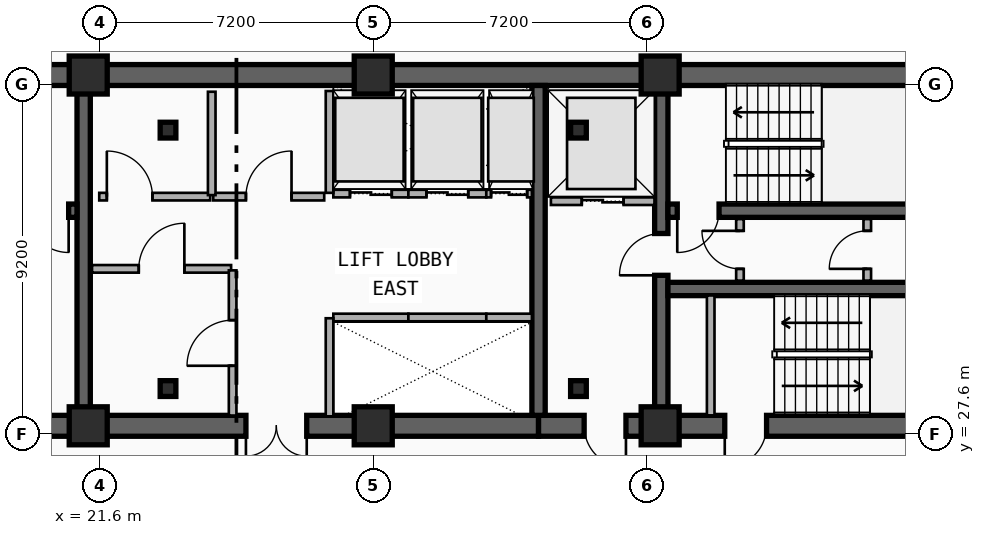
"""IFC4 building model, lengths in metres.
Left out: names, types, materials, properties, quantities, classifications, styles, units other than length and angle.
Written with IfcOpenShell. Run it as: python <this file> out.ifc"""

import sys

from ifc_helpers import new_model, si_unit, direction, frame, frame_2d, origin, origin_2d, place, context, subcontext, project, spatial, rectangle, i_section, extrude, element, fill, save


model = new_model("IFC4")
c1 = context("Model", 3, precision=1e-05, world=origin(), true_north=direction((0.0, 1.0)))
c2 = subcontext(c1, "Body", "Model", "MODEL_VIEW")
j1 = project(units=[si_unit("LENGTHUNIT", "METRE"), si_unit("PLANEANGLEUNIT", "RADIAN")], contexts=[c1])
p1 = place(None, origin())
s1 = spatial("IfcSite", under=j1, at=p1, CompositionType="ELEMENT")
p2 = place(p1, origin())
s2 = spatial("IfcBuilding", under=s1, at=p2, CompositionType="ELEMENT")
p3 = place(p2, frame((0.0, 0.0, 180.3)))
s3 = spatial("IfcBuildingStorey", under=s2, at=p3, CompositionType="ELEMENT", Elevation=180.3)
p4 = place(p3, frame((12.15, 37.05, 0.0), z_axis=(0.0, 0.0, 1.0), x_axis=(1.0, 0.0, 0.0)))
e1 = element("IfcWall", 1, at=p4, inside=s3, PredefinedType="SHEAR", context=c2, shape_type="SweptSolid", body=[
    extrude(rectangle(XDim=33.23, YDim=0.55, at=frame_2d((16.615, 0.0))), origin(), (0.0, 0.0, 1.0), 3.55),
])
p5 = place(p3, frame((21.18, 27.82, 0.0), z_axis=(0.0, 0.0, 1.0), x_axis=(-1.0, 0.0, 0.0)))
e2 = element("IfcWall", 2, at=p5, inside=s3, PredefinedType="SHEAR", context=c2, shape_type="SweptSolid", body=[
    extrude(rectangle(XDim=9.03, YDim=0.55, at=frame_2d((4.515, 0.0))), origin(), (0.0, 0.0, 1.0), 3.55),
])
p6 = place(p5, frame((2.68, 0.0, 0.0)))
e3 = element("IfcOpeningElement", 3, at=p6, cuts=e2, PredefinedType="OPENING", context=c2, shape_type="SweptSolid", body=[
    extrude(rectangle(XDim=1.1, YDim=2.15, at=frame_2d((0.55, 1.075))), frame((0.0, 0.285, 0.0), z_axis=(0.0, -1.0, 0.0), x_axis=(1.0, 0.0, 0.0)), (0.0, 0.0, 1.0), 0.57),
])
p7 = place(p3, frame((33.15, 27.82, 0.0), z_axis=(0.0, 0.0, 1.0), x_axis=(-1.0, 0.0, 0.0)))
e4 = element("IfcWall", 4, at=p7, inside=s3, PredefinedType="SHEAR", context=c2, shape_type="SweptSolid", body=[
    extrude(rectangle(XDim=11.97, YDim=0.55, at=frame_2d((5.985, 0.0))), origin(), (0.0, 0.0, 1.0), 3.55),
])
p8 = place(p7, frame((6.1, 0.0, 0.0)))
e5 = element("IfcOpeningElement", 5, at=p8, cuts=e4, PredefinedType="OPENING", context=c2, shape_type="SweptSolid", body=[
    extrude(rectangle(XDim=1.6, YDim=2.2, at=frame_2d((0.8, 1.1))), frame((0.0, 0.285, 0.0), z_axis=(0.0, -1.0, 0.0), x_axis=(1.0, 0.0, 0.0)), (0.0, 0.0, 1.0), 0.57),
])
p9 = place(p3, frame((45.38, 27.82, 0.0), z_axis=(0.0, 0.0, 1.0), x_axis=(-1.0, 0.0, 0.0)))
e6 = element("IfcWall", 6, at=p9, inside=s3, PredefinedType="SHEAR", context=c2, shape_type="SweptSolid", body=[
    extrude(rectangle(XDim=12.23, YDim=0.55, at=frame_2d((6.115, 0.0))), origin(), (0.0, 0.0, 1.0), 3.55),
])
p10 = place(p9, frame((9.93, 0.0, 0.0)))
e7 = element("IfcOpeningElement", 7, at=p10, cuts=e6, PredefinedType="OPENING", context=c2, shape_type="SweptSolid", body=[
    extrude(rectangle(XDim=1.1, YDim=2.15, at=frame_2d((0.55, 1.075))), frame((0.0, 0.285, 0.0), z_axis=(0.0, -1.0, 0.0), x_axis=(1.0, 0.0, 0.0)), (0.0, 0.0, 1.0), 0.57),
])
p11 = place(p9, frame((6.23, 0.0, 0.0)))
e8 = element("IfcOpeningElement", 8, at=p11, cuts=e6, PredefinedType="OPENING", context=c2, shape_type="SweptSolid", body=[
    extrude(rectangle(XDim=1.1, YDim=2.15, at=frame_2d((0.55, 1.075))), frame((0.0, 0.285, 0.0), z_axis=(0.0, -1.0, 0.0), x_axis=(1.0, 0.0, 0.0)), (0.0, 0.0, 1.0), 0.57),
])
for number, where, z_axis, x_axis in (
    (9, (21.18, 28.095, 0.0), (0.0, 0.0, 1.0), (0.0, 1.0, 0.0)),
    (10, (33.15, 28.095, 0.0), (0.0, 0.0, 1.0), (0.0, 1.0, 0.0)),
):
    element("IfcWall", number, at=place(p3, frame(where, z_axis=z_axis, x_axis=x_axis)), inside=s3, PredefinedType="SHEAR", context=c2, shape_type="SweptSolid", body=[
        extrude(rectangle(XDim=8.68, YDim=0.35, at=frame_2d((4.34, 0.0))), origin(), (0.0, 0.0, 1.0), 3.55),
    ])
p12 = place(p3, frame((36.38, 28.095, 0.0), z_axis=(0.0, 0.0, 1.0), x_axis=(0.0, 1.0, 0.0)))
e11 = element("IfcWall", 11, at=p12, inside=s3, PredefinedType="SHEAR", context=c2, shape_type="SweptSolid", body=[
    extrude(rectangle(XDim=8.68, YDim=0.35, at=frame_2d((4.34, 0.0))), origin(), (0.0, 0.0, 1.0), 3.55),
])
p13 = place(p12, frame((3.685, 0.0, 0.0)))
e12 = element("IfcOpeningElement", 12, at=p13, cuts=e11, PredefinedType="OPENING", context=c2, shape_type="SweptSolid", body=[
    extrude(rectangle(XDim=1.1, YDim=2.15, at=frame_2d((0.55, 1.075))), frame((0.0, 0.185, 0.0), z_axis=(0.0, -1.0, 0.0), x_axis=(1.0, 0.0, 0.0)), (0.0, 0.0, 1.0), 0.37),
])
p14 = place(p3, frame((21.005, 33.48, 0.0), z_axis=(0.0, 0.0, 1.0), x_axis=(-1.0, 0.0, 0.0)))
e13 = element("IfcWall", 13, at=p14, inside=s3, PredefinedType="SHEAR", context=c2, shape_type="SweptSolid", body=[
    extrude(rectangle(XDim=8.58, YDim=0.35, at=frame_2d((4.29, 0.0))), origin(), (0.0, 0.0, 1.0), 3.55),
])
p15 = place(p14, frame((0.22, 0.0, 0.0)))
e14 = element("IfcOpeningElement", 14, at=p15, cuts=e13, PredefinedType="OPENING", context=c2, shape_type="SweptSolid", body=[
    extrude(rectangle(XDim=1.1, YDim=2.15, at=frame_2d((0.55, 1.075))), frame((0.0, 0.185, 0.0), z_axis=(0.0, -1.0, 0.0), x_axis=(1.0, 0.0, 0.0)), (0.0, 0.0, 1.0), 0.37),
])
p16 = place(p3, frame((45.105, 33.48, 0.0), z_axis=(0.0, 0.0, 1.0), x_axis=(-1.0, 0.0, 0.0)))
e15 = element("IfcWall", 15, at=p16, inside=s3, PredefinedType="SHEAR", context=c2, shape_type="SweptSolid", body=[
    extrude(rectangle(XDim=8.55, YDim=0.35, at=frame_2d((4.275, 0.0))), origin(), (0.0, 0.0, 1.0), 3.55),
])
p17 = place(p16, frame((7.205, 0.0, 0.0)))
e16 = element("IfcOpeningElement", 16, at=p17, cuts=e15, PredefinedType="OPENING", context=c2, shape_type="SweptSolid", body=[
    extrude(rectangle(XDim=1.1, YDim=2.15, at=frame_2d((0.55, 1.075))), frame((0.0, 0.185, 0.0), z_axis=(0.0, -1.0, 0.0), x_axis=(1.0, 0.0, 0.0)), (0.0, 0.0, 1.0), 0.37),
])
p18 = place(p3, frame((36.555, 31.42, 0.0), z_axis=(0.0, 0.0, 1.0), x_axis=(1.0, 0.0, 0.0)))
e17 = element("IfcWall", 17, at=p18, inside=s3, PredefinedType="SHEAR", context=c2, shape_type="SweptSolid", body=[
    extrude(rectangle(XDim=8.55, YDim=0.35, at=frame_2d((4.275, 0.0))), origin(), (0.0, 0.0, 1.0), 3.55),
])
for number, where, z_axis, x_axis in (
    (18, (23.4, 28.8, 0.0), (0.0, 0.0, 1.0), (1.0, 0.0, 0.0)),
    (19, (34.2, 28.8, 0.0), (0.0, 0.0, 1.0), (1.0, 0.0, 0.0)),
    (20, (34.2, 35.6, 0.0), (0.0, 0.0, 1.0), (1.0, 0.0, 0.0)),
    (21, (23.4, 35.6, 0.0), (0.0, 0.0, 1.0), (1.0, 0.0, 0.0)),
):
    element("IfcColumn", number, at=place(p3, frame(where, z_axis=z_axis, x_axis=x_axis)), inside=s3, PredefinedType="COLUMN", context=c2, shape_type="SweptSolid", body=[
        extrude(i_section(OverallWidth=0.413, OverallDepth=0.415, WebThickness=0.03, FlangeThickness=0.047, FilletRadius=0.015, at=origin_2d()), origin(), (0.0, 0.0, 1.0), 3.55),
    ])
for number, where, z_axis, x_axis in (
    (22, (21.3, 27.82, 0.0), (0.0, 0.0, 1.0), (1.0, 0.0, 0.0)),
    (23, (21.3, 37.05, 0.0), (0.0, 0.0, 1.0), (1.0, 0.0, 0.0)),
    (24, (28.8, 27.82, 0.0), (0.0, 0.0, 1.0), (1.0, 0.0, 0.0)),
    (25, (28.8, 37.05, 0.0), (0.0, 0.0, 1.0), (1.0, 0.0, 0.0)),
    (26, (36.35, 27.82, 0.0), (0.0, 0.0, 1.0), (1.0, 0.0, 0.0)),
    (27, (36.35, 37.05, 0.0), (0.0, 0.0, 1.0), (1.0, 0.0, 0.0)),
):
    element("IfcColumn", number, at=place(p3, frame(where, z_axis=z_axis, x_axis=x_axis)), inside=s3, PredefinedType="COLUMN", context=c2, shape_type="SweptSolid", body=[
        extrude(rectangle(XDim=1.0, YDim=1.0, at=origin_2d()), origin(), (0.0, 0.0, 1.0), 3.55),
    ])
p19 = place(p3, frame((33.475, 33.73, 0.0), z_axis=(0.0, 0.0, 1.0), x_axis=(1.0, 0.0, 0.0)))
e28 = element("IfcWall", 28, at=p19, inside=s3, PredefinedType="PARTITIONING", context=c2, shape_type="SweptSolid", body=[
    extrude(rectangle(XDim=2.725, YDim=0.2, at=frame_2d((1.362, 0.0))), origin(), (0.0, 0.0, 1.0), 2.36),
])
p20 = place(p19, frame((0.812, 0.0, 0.0)))
e29 = element("IfcOpeningElement", 29, at=p20, cuts=e28, PredefinedType="OPENING", context=c2, shape_type="SweptSolid", body=[
    extrude(rectangle(XDim=1.1, YDim=2.15, at=frame_2d((0.55, 1.075))), frame((0.0, 0.11, 0.0), z_axis=(0.0, -1.0, 0.0), x_axis=(1.0, 0.0, 0.0)), (0.0, 0.0, 1.0), 0.22),
])
p21 = place(p3, frame((27.75, 30.67, 0.0), z_axis=(0.0, 0.0, 1.0), x_axis=(1.0, 0.0, 0.0)))
e30 = element("IfcWall", 30, at=p21, inside=s3, PredefinedType="PARTITIONING", context=c2, shape_type="SweptSolid", body=[
    extrude(rectangle(XDim=1.975, YDim=0.2, at=frame_2d((0.988, 0.0))), origin(), (0.0, 0.0, 1.0), 2.36),
])
p22 = place(p3, frame((27.65, 28.07, 0.0), z_axis=(0.0, 0.0, 1.0), x_axis=(0.0, 1.0, 0.0)))
e31 = element("IfcWall", 31, at=p22, inside=s3, PredefinedType="PARTITIONING", context=c2, shape_type="SweptSolid", body=[
    extrude(rectangle(XDim=2.58, YDim=0.2, at=frame_2d((1.29, 0.0))), origin(), (0.0, 0.0, 1.0), 2.36),
])
p23 = place(p3, frame((29.725, 30.67, 0.0), z_axis=(0.0, 0.0, 1.0), x_axis=(1.0, 0.0, 0.0)))
e32 = element("IfcWall", 32, at=p23, inside=s3, PredefinedType="PARTITIONING", context=c2, shape_type="SweptSolid", body=[
    extrude(rectangle(XDim=2.05, YDim=0.2, at=frame_2d((1.025, 0.0))), origin(), (0.0, 0.0, 1.0), 2.67),
])
p24 = place(p3, frame((31.775, 30.67, 0.0), z_axis=(0.0, 0.0, 1.0), x_axis=(1.0, 0.0, 0.0)))
e33 = element("IfcWall", 33, at=p24, inside=s3, PredefinedType="PARTITIONING", context=c2, shape_type="SweptSolid", body=[
    extrude(rectangle(XDim=1.2, YDim=0.2, at=frame_2d((0.6, 0.0))), origin(), (0.0, 0.0, 1.0), 2.67),
])
p25 = place(p3, frame((27.75, 33.93, 0.0), z_axis=(0.0, 0.0, 1.0), x_axis=(1.0, 0.0, 0.0)))
e34 = element("IfcWall", 34, at=p25, inside=s3, PredefinedType="PARTITIONING", context=c2, shape_type="SweptSolid", body=[
    extrude(rectangle(XDim=1.975, YDim=0.2, at=frame_2d((0.988, 0.0))), origin(), (0.0, 0.0, 1.0), 2.36),
])
p26 = place(p25, frame((0.438, 0.0, 0.0)))
e35 = element("IfcOpeningElement", 35, at=p26, cuts=e34, PredefinedType="OPENING", context=c2, shape_type="SweptSolid", body=[
    extrude(rectangle(XDim=1.1, YDim=2.15, at=frame_2d((0.55, 1.075))), frame((0.0, 0.11, 0.0), z_axis=(0.0, -1.0, 0.0), x_axis=(1.0, 0.0, 0.0)), (0.0, 0.0, 1.0), 0.22),
])
p27 = place(p3, frame((27.65, 33.95, 0.0), z_axis=(0.0, 0.0, 1.0), x_axis=(0.0, 1.0, 0.0)))
e36 = element("IfcWall", 36, at=p27, inside=s3, PredefinedType="PARTITIONING", context=c2, shape_type="SweptSolid", body=[
    extrude(rectangle(XDim=2.68, YDim=0.2, at=frame_2d((1.34, 0.0))), origin(), (0.0, 0.0, 1.0), 2.36),
])
p28 = place(p3, frame((29.725, 33.93, 0.0), z_axis=(0.0, 0.0, 1.0), x_axis=(1.0, 0.0, 0.0)))
e37 = element("IfcWall", 37, at=p28, inside=s3, PredefinedType="PARTITIONING", context=c2, shape_type="SweptSolid", body=[
    extrude(rectangle(XDim=2.05, YDim=0.2, at=frame_2d((1.025, 0.0))), origin(), (0.0, 0.0, 1.0), 3.29),
])
p29 = place(p28, frame((0.475, 0.0, 0.0)))
e38 = element("IfcOpeningElement", 38, at=p29, cuts=e37, PredefinedType="OPENING", context=c2, shape_type="SweptSolid", body=[
    extrude(rectangle(XDim=1.1, YDim=2.15, at=frame_2d((0.55, 1.075))), frame((0.0, 0.11, 0.0), z_axis=(0.0, -1.0, 0.0), x_axis=(1.0, 0.0, 0.0)), (0.0, 0.0, 1.0), 0.22),
])
p30 = place(p3, frame((31.775, 33.93, 0.0), z_axis=(0.0, 0.0, 1.0), x_axis=(1.0, 0.0, 0.0)))
e39 = element("IfcWall", 39, at=p30, inside=s3, PredefinedType="PARTITIONING", context=c2, shape_type="SweptSolid", body=[
    extrude(rectangle(XDim=1.2, YDim=0.2, at=frame_2d((0.6, 0.0))), origin(), (0.0, 0.0, 1.0), 3.29),
])
p31 = place(p30, frame((0.125, 0.0, 0.0)))
e40 = element("IfcOpeningElement", 40, at=p31, cuts=e39, PredefinedType="OPENING", context=c2, shape_type="SweptSolid", body=[
    extrude(rectangle(XDim=0.95, YDim=2.15, at=frame_2d((0.475, 1.075))), frame((0.0, 0.11, 0.0), z_axis=(0.0, -1.0, 0.0), x_axis=(1.0, 0.0, 0.0)), (0.0, 0.0, 1.0), 0.22),
])
p32 = place(p3, frame((37.68, 28.095, 0.0), z_axis=(0.0, 0.0, 1.0), x_axis=(0.0, 1.0, 0.0)))
e41 = element("IfcWall", 41, at=p32, inside=s3, PredefinedType="PARTITIONING", context=c2, shape_type="SweptSolid", body=[
    extrude(rectangle(XDim=3.155, YDim=0.2, at=frame_2d((1.578, 0.0))), origin(), (0.0, 0.0, 1.0), 2.67),
])
p33 = place(p3, frame((38.45, 31.64, 0.0), z_axis=(0.0, 0.0, 1.0), x_axis=(0.0, 1.0, 0.0)))
e42 = element("IfcWall", 42, at=p33, inside=s3, PredefinedType="PARTITIONING", context=c2, shape_type="SweptSolid", body=[
    extrude(rectangle(XDim=1.62, YDim=0.2, at=frame_2d((0.81, 0.0))), origin(), (0.0, 0.0, 1.0), 3.29),
])
p34 = place(p33, frame((0.31, 0.0, 0.0)))
e43 = element("IfcOpeningElement", 43, at=p34, cuts=e42, PredefinedType="OPENING", context=c2, shape_type="SweptSolid", body=[
    extrude(rectangle(XDim=1.0, YDim=2.15, at=frame_2d((0.5, 1.075))), frame((0.0, 0.11, 0.0), z_axis=(0.0, -1.0, 0.0), x_axis=(1.0, 0.0, 0.0)), (0.0, 0.0, 1.0), 0.22),
])
p35 = place(p3, frame((41.8, 31.64, 0.0), z_axis=(0.0, 0.0, 1.0), x_axis=(0.0, 1.0, 0.0)))
e44 = element("IfcWall", 44, at=p35, inside=s3, PredefinedType="PARTITIONING", context=c2, shape_type="SweptSolid", body=[
    extrude(rectangle(XDim=1.62, YDim=0.2, at=frame_2d((0.81, 0.0))), origin(), (0.0, 0.0, 1.0), 3.29),
])
p36 = place(p35, frame((0.31, 0.0, 0.0)))
e45 = element("IfcOpeningElement", 45, at=p36, cuts=e44, PredefinedType="OPENING", context=c2, shape_type="SweptSolid", body=[
    extrude(rectangle(XDim=1.0, YDim=2.15, at=frame_2d((0.5, 1.075))), frame((0.0, 0.11, 0.0), z_axis=(0.0, -1.0, 0.0), x_axis=(1.0, 0.0, 0.0)), (0.0, 0.0, 1.0), 0.22),
])
p37 = place(p3, frame((21.4, 31.95, 0.0), z_axis=(0.0, 0.0, 1.0), x_axis=(1.0, 0.0, 0.0)))
e46 = element("IfcWall", 46, at=p37, inside=s3, PredefinedType="PARTITIONING", context=c2, shape_type="SweptSolid", body=[
    extrude(rectangle(XDim=3.66, YDim=0.2, at=frame_2d((1.83, 0.0))), origin(), (0.0, 0.0, 1.0), 2.36),
])
p38 = place(p37, frame((1.23, 0.0, 0.0)))
e47 = element("IfcOpeningElement", 47, at=p38, cuts=e46, PredefinedType="OPENING", context=c2, shape_type="SweptSolid", body=[
    extrude(rectangle(XDim=1.2, YDim=2.15, at=frame_2d((0.6, 1.075))), frame((0.0, 0.11, 0.0), z_axis=(0.0, -1.0, 0.0), x_axis=(1.0, 0.0, 0.0)), (0.0, 0.0, 1.0), 0.22),
])
p39 = place(p3, frame((21.59, 33.85, 0.0), z_axis=(0.0, 0.0, 1.0), x_axis=(1.0, 0.0, 0.0)))
e48 = element("IfcWall", 48, at=p39, inside=s3, PredefinedType="PARTITIONING", context=c2, shape_type="SweptSolid", body=[
    extrude(rectangle(XDim=2.92, YDim=0.2, at=frame_2d((1.46, 0.0))), origin(), (0.0, 0.0, 1.0), 2.36),
])
p40 = place(p39, frame((0.2, 0.0, 0.0)))
e49 = element("IfcOpeningElement", 49, at=p40, cuts=e48, PredefinedType="OPENING", context=c2, shape_type="SweptSolid", body=[
    extrude(rectangle(XDim=1.2, YDim=2.15, at=frame_2d((0.6, 1.075))), frame((0.0, 0.11, 0.0), z_axis=(0.0, -1.0, 0.0), x_axis=(1.0, 0.0, 0.0)), (0.0, 0.0, 1.0), 0.22),
])
p41 = place(p3, frame((24.59, 33.85, 0.0), z_axis=(0.0, 0.0, 1.0), x_axis=(1.0, 0.0, 0.0)))
e50 = element("IfcWall", 50, at=p41, inside=s3, PredefinedType="PARTITIONING", context=c2, shape_type="SweptSolid", body=[
    extrude(rectangle(XDim=2.92, YDim=0.2, at=frame_2d((1.46, 0.0))), origin(), (0.0, 0.0, 1.0), 3.29),
])
p42 = place(p41, frame((0.86, 0.0, 0.0)))
e51 = element("IfcOpeningElement", 51, at=p42, cuts=e50, PredefinedType="OPENING", context=c2, shape_type="SweptSolid", body=[
    extrude(rectangle(XDim=1.2, YDim=2.15, at=frame_2d((0.6, 1.075))), frame((0.0, 0.11, 0.0), z_axis=(0.0, -1.0, 0.0), x_axis=(1.0, 0.0, 0.0)), (0.0, 0.0, 1.0), 0.22),
])
p43 = place(p3, frame((25.1, 28.09, 0.0), z_axis=(0.0, 0.0, 1.0), x_axis=(0.0, 1.0, 0.0)))
e52 = element("IfcWall", 52, at=p43, inside=s3, PredefinedType="PARTITIONING", context=c2, shape_type="SweptSolid", body=[
    extrude(rectangle(XDim=3.82, YDim=0.2, at=frame_2d((1.91, 0.0))), origin(), (0.0, 0.0, 1.0), 2.67),
])
p44 = place(p43, frame((1.31, 0.0, 0.0)))
e53 = element("IfcOpeningElement", 53, at=p44, cuts=e52, PredefinedType="OPENING", context=c2, shape_type="SweptSolid", body=[
    extrude(rectangle(XDim=1.2, YDim=2.15, at=frame_2d((0.6, 1.075))), frame((0.0, 0.11, 0.0), z_axis=(0.0, -1.0, 0.0), x_axis=(1.0, 0.0, 0.0)), (0.0, 0.0, 1.0), 0.22),
])
p45 = place(p3, frame((24.55, 33.89, 0.0), z_axis=(0.0, 0.0, 1.0), x_axis=(0.0, 1.0, 0.0)))
e54 = element("IfcWall", 54, at=p45, inside=s3, PredefinedType="PARTITIONING", context=c2, shape_type="SweptSolid", body=[
    extrude(rectangle(XDim=2.72, YDim=0.2, at=frame_2d((1.36, 0.0))), origin(), (0.0, 0.0, 1.0), 3.29),
])
p46 = place(p20, origin())
e55 = element("IfcDoor", 55, at=p46, inside=s3, OperationType="DOUBLE_DOOR_SLIDING", PredefinedType="DOOR", context=c2, shape_type="SweptSolid", body=[
    extrude(rectangle(XDim=1.1, YDim=2.15, at=frame_2d((0.55, 1.075))), frame((0.0, 0.025, 0.0), z_axis=(0.0, -1.0, 0.0), x_axis=(1.0, 0.0, 0.0)), (0.0, 0.0, 1.0), 0.05),
])
fill(e29, e55)
p47 = place(p26, origin())
e56 = element("IfcDoor", 56, at=p47, inside=s3, OperationType="DOUBLE_DOOR_SLIDING", PredefinedType="DOOR", context=c2, shape_type="SweptSolid", body=[
    extrude(rectangle(XDim=1.1, YDim=2.15, at=frame_2d((0.55, 1.075))), frame((0.0, 0.025, 0.0), z_axis=(0.0, -1.0, 0.0), x_axis=(1.0, 0.0, 0.0)), (0.0, 0.0, 1.0), 0.05),
])
fill(e35, e56)
p48 = place(p29, origin())
e57 = element("IfcDoor", 57, at=p48, inside=s3, OperationType="DOUBLE_DOOR_SLIDING", PredefinedType="DOOR", context=c2, shape_type="SweptSolid", body=[
    extrude(rectangle(XDim=1.1, YDim=2.15, at=frame_2d((0.55, 1.075))), frame((0.0, 0.025, 0.0), z_axis=(0.0, -1.0, 0.0), x_axis=(1.0, 0.0, 0.0)), (0.0, 0.0, 1.0), 0.05),
])
fill(e38, e57)
p49 = place(p31, origin())
e58 = element("IfcDoor", 58, at=p49, inside=s3, OperationType="DOUBLE_DOOR_SLIDING", PredefinedType="DOOR", context=c2, shape_type="SweptSolid", body=[
    extrude(rectangle(XDim=0.95, YDim=2.15, at=frame_2d((0.475, 1.075))), frame((0.0, 0.025, 0.0), z_axis=(0.0, -1.0, 0.0), x_axis=(1.0, 0.0, 0.0)), (0.0, 0.0, 1.0), 0.05),
])
fill(e40, e58)
p50 = place(p15, origin())
e59 = element("IfcDoor", 59, at=p50, inside=s3, OperationType="SINGLE_SWING_LEFT", PredefinedType="DOOR", context=c2, shape_type="SweptSolid", body=[
    extrude(rectangle(XDim=1.1, YDim=2.15, at=frame_2d((0.55, 1.075))), frame((0.0, 0.025, 0.0), z_axis=(0.0, -1.0, 0.0), x_axis=(1.0, 0.0, 0.0)), (0.0, 0.0, 1.0), 0.05),
])
fill(e14, e59)
p51 = place(p17, origin())
e60 = element("IfcDoor", 60, at=p51, inside=s3, OperationType="SINGLE_SWING_RIGHT", PredefinedType="DOOR", context=c2, shape_type="SweptSolid", body=[
    extrude(rectangle(XDim=1.1, YDim=2.15, at=frame_2d((0.55, 1.075))), frame((0.0, 0.025, 0.0), z_axis=(0.0, -1.0, 0.0), x_axis=(1.0, 0.0, 0.0)), (0.0, 0.0, 1.0), 0.05),
])
fill(e16, e60)
p52 = place(p13, origin())
e61 = element("IfcDoor", 61, at=p52, inside=s3, OperationType="SINGLE_SWING_LEFT", PredefinedType="DOOR", context=c2, shape_type="SweptSolid", body=[
    extrude(rectangle(XDim=1.1, YDim=2.15, at=frame_2d((0.55, 1.075))), frame((0.0, 0.025, 0.0), z_axis=(0.0, -1.0, 0.0), x_axis=(1.0, 0.0, 0.0)), (0.0, 0.0, 1.0), 0.05),
])
fill(e12, e61)
p53 = place(p10, origin())
e62 = element("IfcDoor", 62, at=p53, inside=s3, OperationType="SINGLE_SWING_LEFT", PredefinedType="DOOR", context=c2, shape_type="SweptSolid", body=[
    extrude(rectangle(XDim=1.1, YDim=2.15, at=frame_2d((0.55, 1.075))), frame((0.0, 0.025, 0.0), z_axis=(0.0, -1.0, 0.0), x_axis=(1.0, 0.0, 0.0)), (0.0, 0.0, 1.0), 0.05),
])
fill(e7, e62)
p54 = place(p11, origin())
e63 = element("IfcDoor", 63, at=p54, inside=s3, OperationType="SINGLE_SWING_RIGHT", PredefinedType="DOOR", context=c2, shape_type="SweptSolid", body=[
    extrude(rectangle(XDim=1.1, YDim=2.15, at=frame_2d((0.55, 1.075))), frame((0.0, 0.025, 0.0), z_axis=(0.0, -1.0, 0.0), x_axis=(1.0, 0.0, 0.0)), (0.0, 0.0, 1.0), 0.05),
])
fill(e8, e63)
p55 = place(p8, origin())
e64 = element("IfcDoor", 64, at=p55, inside=s3, OperationType="SINGLE_SWING_LEFT", PredefinedType="DOOR", context=c2, shape_type="SweptSolid", body=[
    extrude(rectangle(XDim=1.6, YDim=2.2, at=frame_2d((0.8, 1.1))), frame((0.0, 0.025, 0.0), z_axis=(0.0, -1.0, 0.0), x_axis=(1.0, 0.0, 0.0)), (0.0, 0.0, 1.0), 0.05),
])
fill(e5, e64)
p56 = place(p34, origin())
e65 = element("IfcDoor", 65, at=p56, inside=s3, OperationType="SINGLE_SWING_RIGHT", PredefinedType="DOOR", context=c2, shape_type="SweptSolid", body=[
    extrude(rectangle(XDim=1.0, YDim=2.15, at=frame_2d((0.5, 1.075))), frame((0.0, 0.025, 0.0), z_axis=(0.0, -1.0, 0.0), x_axis=(1.0, 0.0, 0.0)), (0.0, 0.0, 1.0), 0.05),
])
fill(e43, e65)
p57 = place(p36, origin())
e66 = element("IfcDoor", 66, at=p57, inside=s3, OperationType="SINGLE_SWING_LEFT", PredefinedType="DOOR", context=c2, shape_type="SweptSolid", body=[
    extrude(rectangle(XDim=1.0, YDim=2.15, at=frame_2d((0.5, 1.075))), frame((0.0, 0.025, 0.0), z_axis=(0.0, -1.0, 0.0), x_axis=(1.0, 0.0, 0.0)), (0.0, 0.0, 1.0), 0.05),
])
fill(e45, e66)
p58 = place(p38, origin())
e67 = element("IfcDoor", 67, at=p58, inside=s3, OperationType="SINGLE_SWING_RIGHT", PredefinedType="DOOR", context=c2, shape_type="SweptSolid", body=[
    extrude(rectangle(XDim=1.2, YDim=2.15, at=frame_2d((0.6, 1.075))), frame((0.0, 0.025, 0.0), z_axis=(0.0, -1.0, 0.0), x_axis=(1.0, 0.0, 0.0)), (0.0, 0.0, 1.0), 0.05),
])
fill(e47, e67)
p59 = place(p40, origin())
e68 = element("IfcDoor", 68, at=p59, inside=s3, OperationType="SINGLE_SWING_LEFT", PredefinedType="DOOR", context=c2, shape_type="SweptSolid", body=[
    extrude(rectangle(XDim=1.2, YDim=2.15, at=frame_2d((0.6, 1.075))), frame((0.0, 0.025, 0.0), z_axis=(0.0, -1.0, 0.0), x_axis=(1.0, 0.0, 0.0)), (0.0, 0.0, 1.0), 0.05),
])
fill(e49, e68)
p60 = place(p42, origin())
e69 = element("IfcDoor", 69, at=p60, inside=s3, OperationType="SINGLE_SWING_RIGHT", PredefinedType="DOOR", context=c2, shape_type="SweptSolid", body=[
    extrude(rectangle(XDim=1.2, YDim=2.15, at=frame_2d((0.6, 1.075))), frame((0.0, 0.025, 0.0), z_axis=(0.0, -1.0, 0.0), x_axis=(1.0, 0.0, 0.0)), (0.0, 0.0, 1.0), 0.05),
])
fill(e51, e69)
p61 = place(p44, origin())
e70 = element("IfcDoor", 70, at=p61, inside=s3, OperationType="SINGLE_SWING_LEFT", PredefinedType="DOOR", context=c2, shape_type="SweptSolid", body=[
    extrude(rectangle(XDim=1.2, YDim=2.15, at=frame_2d((0.6, 1.075))), frame((0.0, 0.025, 0.0), z_axis=(0.0, -1.0, 0.0), x_axis=(1.0, 0.0, 0.0)), (0.0, 0.0, 1.0), 0.05),
])
fill(e53, e70)
save(model, sys.argv[1])
